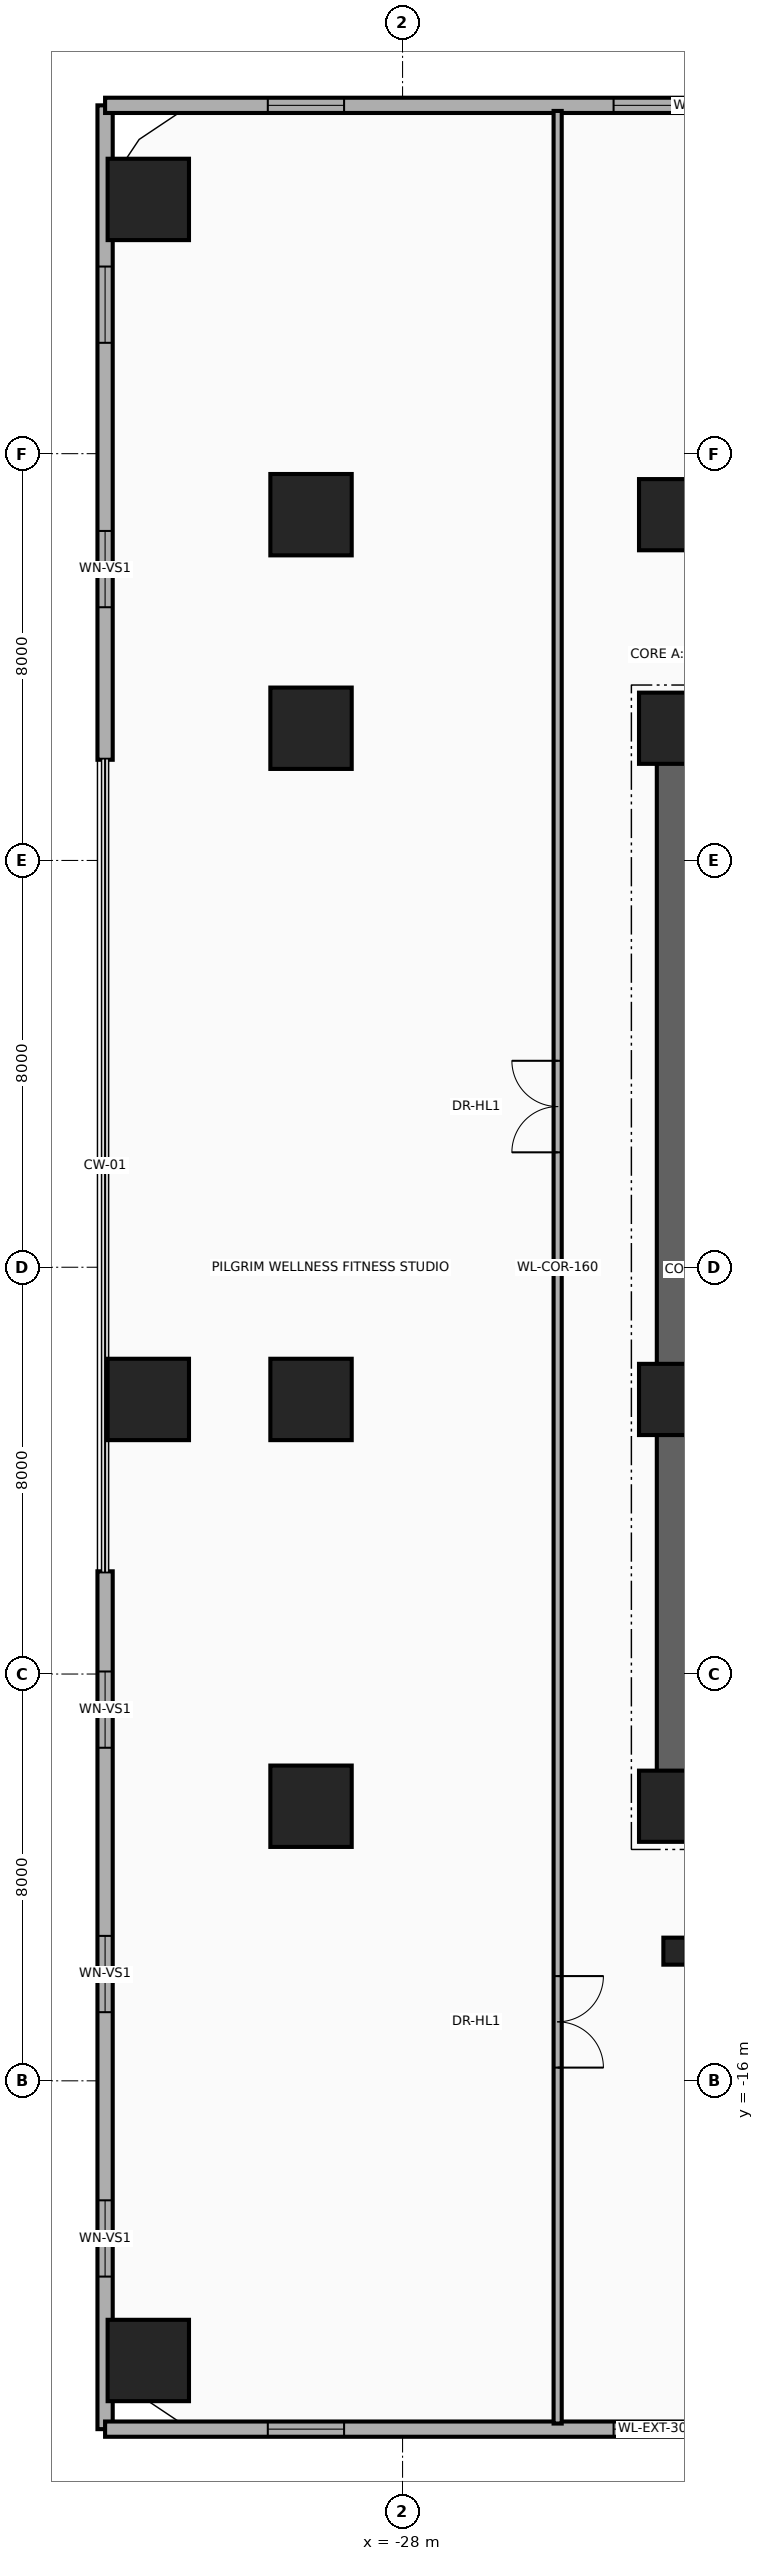
"""IFC4 building model, lengths in metres.
Left out: names, types, materials, properties, quantities, classifications, styles, units other than length and angle.
Written with IfcOpenShell. Run it as: python <this file> out.ifc"""

import sys

from ifc_helpers import new_model, si_unit, direction, frame, frame_2d, origin, origin_2d, place, context, subcontext, project, spatial, rectangle, i_section, extrude, source, transform, mapped, element, fill, save


model = new_model("IFC4")
c1 = context("Model", 3, precision=1e-05, world=origin(), true_north=direction((0.0, 1.0)))
c2 = subcontext(c1, "Body", "Model", "MODEL_VIEW")
j1 = project(units=[si_unit("LENGTHUNIT", "METRE"), si_unit("PLANEANGLEUNIT", "RADIAN")], contexts=[c1])
p1 = place(None, origin())
s1 = spatial("IfcSite", under=j1, at=p1, CompositionType="ELEMENT")
p2 = place(p1, origin())
s2 = spatial("IfcBuilding", under=s1, at=p2, CompositionType="ELEMENT")
p3 = place(p2, frame((0.0, 0.0, 20.8)))
s3 = spatial("IfcBuildingStorey", under=s2, at=p3, CompositionType="ELEMENT", Elevation=20.8)
p4 = place(p3, frame((-22.65, -11.15, 0.0), z_axis=(0.0, 0.0, 1.0), x_axis=(0.0, 1.0, 0.0)))
e1 = element("IfcWall", 1, at=p4, inside=s3, PredefinedType="SHEAR", context=c2, shape_type="SweptSolid", body=[
    extrude(rectangle(XDim=22.3, YDim=0.7, at=frame_2d((11.15, 0.0))), origin(), (0.0, 0.0, 1.0), 4.96),
])
for number, where, z_axis, x_axis in (
    (2, (-22.65, 10.8, 0.0), (0.0, 0.0, 1.0), (1.0, 0.0, 0.0)),
    (3, (-22.65, -10.8, 0.0), (0.0, 0.0, 1.0), (1.0, 0.0, 0.0)),
):
    element("IfcWall", number, at=place(p3, frame(where, z_axis=z_axis, x_axis=x_axis)), inside=s3, PredefinedType="SHEAR", context=c2, shape_type="SweptSolid", body=[
        extrude(rectangle(XDim=10.25, YDim=0.7, at=frame_2d((5.125, 0.0))), origin(), (0.0, 0.0, 1.0), 4.96),
    ])
m1 = source(origin(), c2, "Body", "SweptSolid", [
    extrude(rectangle(XDim=1.6, YDim=1.6, at=origin_2d()), origin(), (0.0, 0.0, 1.0), 5.2),
])
p5 = place(p3, frame((-29.8, -10.6, 0.0), z_axis=(0.0, 0.0, 1.0), x_axis=(1.0, 0.0, 0.0)))
e4 = element("IfcColumn", 4, at=p5, inside=s3, PredefinedType="COLUMN", context=c2, shape_type="MappedRepresentation", body=[
    mapped(m1, transform((0.0, 0.0, 0.0), x_axis=(1.0, 0.0, 0.0), y_axis=(0.0, 1.0, 0.0), z_axis=(0.0, 0.0, 1.0), scale=1.0)),
])
m2 = source(origin(), c2, "Body", "SweptSolid", [
    extrude(rectangle(XDim=1.4, YDim=1.4, at=origin_2d()), origin(), (0.0, 0.0, 1.0), 5.2),
])
p6 = place(p3, frame((-22.65, -10.6, 0.0), z_axis=(0.0, 0.0, 1.0), x_axis=(1.0, 0.0, 0.0)))
e5 = element("IfcColumn", 5, at=p6, inside=s3, PredefinedType="COLUMN", context=c2, shape_type="MappedRepresentation", body=[
    mapped(m2, transform((0.0, 0.0, 0.0), x_axis=(1.0, 0.0, 0.0), y_axis=(0.0, 1.0, 0.0), z_axis=(0.0, 0.0, 1.0), scale=1.0)),
])
p7 = place(p3, frame((-29.8, -2.6, 0.0), z_axis=(0.0, 0.0, 1.0), x_axis=(1.0, 0.0, 0.0)))
e6 = element("IfcColumn", 6, at=p7, inside=s3, PredefinedType="COLUMN", context=c2, shape_type="MappedRepresentation", body=[
    mapped(m1, transform((0.0, 0.0, 0.0), x_axis=(1.0, 0.0, 0.0), y_axis=(0.0, 1.0, 0.0), z_axis=(0.0, 0.0, 1.0), scale=1.0)),
])
p8 = place(p3, frame((-22.65, -2.6, 0.0), z_axis=(0.0, 0.0, 1.0), x_axis=(1.0, 0.0, 0.0)))
e7 = element("IfcColumn", 7, at=p8, inside=s3, PredefinedType="COLUMN", context=c2, shape_type="MappedRepresentation", body=[
    mapped(m2, transform((0.0, 0.0, 0.0), x_axis=(1.0, 0.0, 0.0), y_axis=(0.0, 1.0, 0.0), z_axis=(0.0, 0.0, 1.0), scale=1.0)),
])
p9 = place(p3, frame((-29.8, 10.6, 0.0), z_axis=(0.0, 0.0, 1.0), x_axis=(1.0, 0.0, 0.0)))
e8 = element("IfcColumn", 8, at=p9, inside=s3, PredefinedType="COLUMN", context=c2, shape_type="MappedRepresentation", body=[
    mapped(m1, transform((0.0, 0.0, 0.0), x_axis=(1.0, 0.0, 0.0), y_axis=(0.0, 1.0, 0.0), z_axis=(0.0, 0.0, 1.0), scale=1.0)),
])
p10 = place(p3, frame((-22.65, 10.6, 0.0), z_axis=(0.0, 0.0, 1.0), x_axis=(1.0, 0.0, 0.0)))
e9 = element("IfcColumn", 9, at=p10, inside=s3, PredefinedType="COLUMN", context=c2, shape_type="MappedRepresentation", body=[
    mapped(m2, transform((0.0, 0.0, 0.0), x_axis=(1.0, 0.0, 0.0), y_axis=(0.0, 1.0, 0.0), z_axis=(0.0, 0.0, 1.0), scale=1.0)),
])
p11 = place(p3, frame((-29.8, 14.8, 0.0), z_axis=(0.0, 0.0, 1.0), x_axis=(1.0, 0.0, 0.0)))
e10 = element("IfcColumn", 10, at=p11, inside=s3, PredefinedType="COLUMN", context=c2, shape_type="MappedRepresentation", body=[
    mapped(m1, transform((0.0, 0.0, 0.0), x_axis=(1.0, 0.0, 0.0), y_axis=(0.0, 1.0, 0.0), z_axis=(0.0, 0.0, 1.0), scale=1.0)),
])
p12 = place(p3, frame((-22.65, 14.8, 0.0), z_axis=(0.0, 0.0, 1.0), x_axis=(1.0, 0.0, 0.0)))
e11 = element("IfcColumn", 11, at=p12, inside=s3, PredefinedType="COLUMN", context=c2, shape_type="MappedRepresentation", body=[
    mapped(m2, transform((0.0, 0.0, 0.0), x_axis=(1.0, 0.0, 0.0), y_axis=(0.0, 1.0, 0.0), z_axis=(0.0, 0.0, 1.0), scale=1.0)),
])
m3 = source(origin(), c2, "Body", "SweptSolid", [
    extrude(i_section(OverallWidth=0.442, OverallDepth=0.531, WebThickness=0.066, FlangeThickness=0.106, at=origin_2d()), origin(), (0.0, 0.0, 1.0), 5.2),
])
p13 = place(p3, frame((-22.65, -13.45, 0.0), z_axis=(0.0, 0.0, 1.0), x_axis=(1.0, 0.0, 0.0)))
e12 = element("IfcColumn", 12, at=p13, inside=s3, PredefinedType="COLUMN", context=c2, shape_type="MappedRepresentation", body=[
    mapped(m3, transform((0.0, 0.0, 0.0), x_axis=(1.0, 0.0, 0.0), y_axis=(0.0, 1.0, 0.0), z_axis=(0.0, 0.0, 1.0), scale=1.0)),
])
for number, where, z_axis, x_axis in (
    (13, (-33.0, -21.5, 0.0), (0.0, 0.0, 1.0), (1.0, 0.0, 0.0)),
    (14, (-33.0, -2.6, 0.0), (0.0, 0.0, 1.0), (1.0, 0.0, 0.0)),
    (15, (-33.0, 21.0, 0.0), (0.0, 0.0, 1.0), (1.0, 0.0, 0.0)),
):
    element("IfcColumn", number, at=place(p3, frame(where, z_axis=z_axis, x_axis=x_axis)), inside=s3, PredefinedType="COLUMN", context=c2, shape_type="MappedRepresentation", body=[
        mapped(m1, transform((0.0, 0.0, 0.0), x_axis=(1.0, 0.0, 0.0), y_axis=(0.0, 1.0, 0.0), z_axis=(0.0, 0.0, 1.0), scale=1.0)),
    ])
p14 = place(p3, frame((-33.85, -22.85, 0.0), z_axis=(0.0, 0.0, 1.0), x_axis=(0.0, 1.0, 0.0)))
e16 = element("IfcWall", 16, at=p14, inside=s3, PredefinedType="SOLIDWALL", context=c2, shape_type="SweptSolid", body=[
    extrude(rectangle(XDim=16.87, YDim=0.3, at=frame_2d((8.435, 0.0))), origin(), (0.0, 0.0, 1.0), 4.594),
])
p15 = place(p14, frame((3.0, 0.0, 0.9)))
e17 = element("IfcOpeningElement", 17, at=p15, cuts=e16, PredefinedType="OPENING", context=c2, shape_type="SweptSolid", body=[
    extrude(rectangle(XDim=1.5, YDim=1.75, at=frame_2d((0.75, 0.875))), frame((0.0, 0.165, 0.0), z_axis=(0.0, -1.0, 0.0), x_axis=(1.0, 0.0, 0.0)), (0.0, 0.0, 1.0), 0.33),
])
p16 = place(p14, frame((8.2, 0.0, 0.9)))
e18 = element("IfcOpeningElement", 18, at=p16, cuts=e16, PredefinedType="OPENING", context=c2, shape_type="SweptSolid", body=[
    extrude(rectangle(XDim=1.5, YDim=1.75, at=frame_2d((0.75, 0.875))), frame((0.0, 0.165, 0.0), z_axis=(0.0, -1.0, 0.0), x_axis=(1.0, 0.0, 0.0)), (0.0, 0.0, 1.0), 0.33),
])
p17 = place(p14, frame((13.4, 0.0, 0.9)))
e19 = element("IfcOpeningElement", 19, at=p17, cuts=e16, PredefinedType="OPENING", context=c2, shape_type="SweptSolid", body=[
    extrude(rectangle(XDim=1.5, YDim=1.75, at=frame_2d((0.75, 0.875))), frame((0.0, 0.165, 0.0), z_axis=(0.0, -1.0, 0.0), x_axis=(1.0, 0.0, 0.0)), (0.0, 0.0, 1.0), 0.33),
])
p18 = place(p3, frame((-33.85, 9.98, 0.0), z_axis=(0.0, 0.0, 1.0), x_axis=(0.0, 1.0, 0.0)))
e20 = element("IfcWall", 20, at=p18, inside=s3, PredefinedType="SOLIDWALL", context=c2, shape_type="SweptSolid", body=[
    extrude(rectangle(XDim=12.87, YDim=0.3, at=frame_2d((6.435, 0.0))), origin(), (0.0, 0.0, 1.0), 4.96),
])
p19 = place(p18, frame((3.0, 0.0, 0.9)))
e21 = element("IfcOpeningElement", 21, at=p19, cuts=e20, PredefinedType="OPENING", context=c2, shape_type="SweptSolid", body=[
    extrude(rectangle(XDim=1.5, YDim=1.75, at=frame_2d((0.75, 0.875))), frame((0.0, 0.165, 0.0), z_axis=(0.0, -1.0, 0.0), x_axis=(1.0, 0.0, 0.0)), (0.0, 0.0, 1.0), 0.33),
])
p20 = place(p18, frame((8.2, 0.0, 0.9)))
e22 = element("IfcOpeningElement", 22, at=p20, cuts=e20, PredefinedType="OPENING", context=c2, shape_type="SweptSolid", body=[
    extrude(rectangle(XDim=1.5, YDim=1.75, at=frame_2d((0.75, 0.875))), frame((0.0, 0.165, 0.0), z_axis=(0.0, -1.0, 0.0), x_axis=(1.0, 0.0, 0.0)), (0.0, 0.0, 1.0), 0.33),
])
p21 = place(p3, frame((-33.85, -22.85, 0.0), z_axis=(0.0, 0.0, 1.0), x_axis=(1.0, 0.0, 0.0)))
e23 = element("IfcWall", 23, at=p21, inside=s3, PredefinedType="SOLIDWALL", context=c2, shape_type="SweptSolid", body=[
    extrude(rectangle(XDim=21.69, YDim=0.3, at=frame_2d((10.845, 0.0))), origin(), (0.0, 0.0, 1.0), 4.96),
])
p22 = place(p21, frame((3.2, 0.0, 0.9)))
e24 = element("IfcOpeningElement", 24, at=p22, cuts=e23, PredefinedType="OPENING", context=c2, shape_type="SweptSolid", body=[
    extrude(rectangle(XDim=1.5, YDim=1.75, at=frame_2d((0.75, 0.875))), frame((0.0, 0.165, 0.0), z_axis=(0.0, -1.0, 0.0), x_axis=(1.0, 0.0, 0.0)), (0.0, 0.0, 1.0), 0.33),
])
p23 = place(p21, frame((10.0, 0.0, 0.9)))
e25 = element("IfcOpeningElement", 25, at=p23, cuts=e23, PredefinedType="OPENING", context=c2, shape_type="SweptSolid", body=[
    extrude(rectangle(XDim=1.5, YDim=1.75, at=frame_2d((0.75, 0.875))), frame((0.0, 0.165, 0.0), z_axis=(0.0, -1.0, 0.0), x_axis=(1.0, 0.0, 0.0)), (0.0, 0.0, 1.0), 0.33),
])
p24 = place(p21, frame((17.8, 0.0, 0.9)))
e26 = element("IfcOpeningElement", 26, at=p24, cuts=e23, PredefinedType="OPENING", context=c2, shape_type="SweptSolid", body=[
    extrude(rectangle(XDim=1.5, YDim=1.75, at=frame_2d((0.75, 0.875))), frame((0.0, 0.165, 0.0), z_axis=(0.0, -1.0, 0.0), x_axis=(1.0, 0.0, 0.0)), (0.0, 0.0, 1.0), 0.33),
])
p25 = place(p3, frame((-33.85, 22.85, 0.0), z_axis=(0.0, 0.0, 1.0), x_axis=(1.0, 0.0, 0.0)))
e27 = element("IfcWall", 27, at=p25, inside=s3, PredefinedType="SOLIDWALL", context=c2, shape_type="SweptSolid", body=[
    extrude(rectangle(XDim=23.87, YDim=0.3, at=frame_2d((11.935, 0.0))), origin(), (0.0, 0.0, 1.0), 4.96),
])
p26 = place(p25, frame((3.2, 0.0, 0.9)))
e28 = element("IfcOpeningElement", 28, at=p26, cuts=e27, PredefinedType="OPENING", context=c2, shape_type="SweptSolid", body=[
    extrude(rectangle(XDim=1.5, YDim=1.75, at=frame_2d((0.75, 0.875))), frame((0.0, 0.165, 0.0), z_axis=(0.0, -1.0, 0.0), x_axis=(1.0, 0.0, 0.0)), (0.0, 0.0, 1.0), 0.33),
])
p27 = place(p25, frame((10.0, 0.0, 0.9)))
e29 = element("IfcOpeningElement", 29, at=p27, cuts=e27, PredefinedType="OPENING", context=c2, shape_type="SweptSolid", body=[
    extrude(rectangle(XDim=1.5, YDim=1.75, at=frame_2d((0.75, 0.875))), frame((0.0, 0.165, 0.0), z_axis=(0.0, -1.0, 0.0), x_axis=(1.0, 0.0, 0.0)), (0.0, 0.0, 1.0), 0.33),
])
p28 = place(p25, frame((17.8, 0.0, 0.9)))
e30 = element("IfcOpeningElement", 30, at=p28, cuts=e27, PredefinedType="OPENING", context=c2, shape_type="SweptSolid", body=[
    extrude(rectangle(XDim=1.5, YDim=1.75, at=frame_2d((0.75, 0.875))), frame((0.0, 0.165, 0.0), z_axis=(0.0, -1.0, 0.0), x_axis=(1.0, 0.0, 0.0)), (0.0, 0.0, 1.0), 0.33),
])
p29 = place(p3, frame((-24.95, -22.74, 0.0), z_axis=(0.0, 0.0, 1.0), x_axis=(0.0, 1.0, 0.0)))
e31 = element("IfcWall", 31, at=p29, inside=s3, PredefinedType="PARTITIONING", context=c2, shape_type="SweptSolid", body=[
    extrude(rectangle(XDim=45.48, YDim=0.16, at=frame_2d((22.74, 0.0))), origin(), (0.0, 0.0, 1.0), 3.745),
])
p30 = place(p29, frame((7.0, 0.0, 0.0)))
e32 = element("IfcOpeningElement", 32, at=p30, cuts=e31, PredefinedType="OPENING", context=c2, shape_type="SweptSolid", body=[
    extrude(rectangle(XDim=1.8, YDim=2.15, at=frame_2d((0.9, 1.075))), frame((0.0, 0.095, 0.0), z_axis=(0.0, -1.0, 0.0), x_axis=(1.0, 0.0, 0.0)), (0.0, 0.0, 1.0), 0.19),
])
p31 = place(p29, frame((25.0, 0.0, 0.0)))
e33 = element("IfcOpeningElement", 33, at=p31, cuts=e31, PredefinedType="OPENING", context=c2, shape_type="SweptSolid", body=[
    extrude(rectangle(XDim=1.8, YDim=2.15, at=frame_2d((0.9, 1.075))), frame((0.0, 0.095, 0.0), z_axis=(0.0, -1.0, 0.0), x_axis=(1.0, 0.0, 0.0)), (0.0, 0.0, 1.0), 0.19),
])
p32 = place(p15, origin())
e34 = element("IfcWindow", 34, at=p32, inside=s3, PartitioningType="SINGLE_PANEL", PredefinedType="WINDOW", context=c2, shape_type="SweptSolid", body=[
    extrude(rectangle(XDim=1.5, YDim=1.75, at=frame_2d((0.75, 0.875))), frame((0.0, 0.03, 0.0), z_axis=(0.0, -1.0, 0.0), x_axis=(1.0, 0.0, 0.0)), (0.0, 0.0, 1.0), 0.06),
])
fill(e17, e34)
p33 = place(p16, origin())
e35 = element("IfcWindow", 35, at=p33, inside=s3, PartitioningType="SINGLE_PANEL", PredefinedType="WINDOW", context=c2, shape_type="SweptSolid", body=[
    extrude(rectangle(XDim=1.5, YDim=1.75, at=frame_2d((0.75, 0.875))), frame((0.0, 0.03, 0.0), z_axis=(0.0, -1.0, 0.0), x_axis=(1.0, 0.0, 0.0)), (0.0, 0.0, 1.0), 0.06),
])
fill(e18, e35)
p34 = place(p17, origin())
e36 = element("IfcWindow", 36, at=p34, inside=s3, PartitioningType="SINGLE_PANEL", PredefinedType="WINDOW", context=c2, shape_type="SweptSolid", body=[
    extrude(rectangle(XDim=1.5, YDim=1.75, at=frame_2d((0.75, 0.875))), frame((0.0, 0.03, 0.0), z_axis=(0.0, -1.0, 0.0), x_axis=(1.0, 0.0, 0.0)), (0.0, 0.0, 1.0), 0.06),
])
fill(e19, e36)
p35 = place(p19, origin())
e37 = element("IfcWindow", 37, at=p35, inside=s3, PartitioningType="SINGLE_PANEL", PredefinedType="WINDOW", context=c2, shape_type="SweptSolid", body=[
    extrude(rectangle(XDim=1.5, YDim=1.75, at=frame_2d((0.75, 0.875))), frame((0.0, 0.03, 0.0), z_axis=(0.0, -1.0, 0.0), x_axis=(1.0, 0.0, 0.0)), (0.0, 0.0, 1.0), 0.06),
])
fill(e21, e37)
p36 = place(p20, origin())
e38 = element("IfcWindow", 38, at=p36, inside=s3, PartitioningType="SINGLE_PANEL", PredefinedType="WINDOW", context=c2, shape_type="SweptSolid", body=[
    extrude(rectangle(XDim=1.5, YDim=1.75, at=frame_2d((0.75, 0.875))), frame((0.0, 0.03, 0.0), z_axis=(0.0, -1.0, 0.0), x_axis=(1.0, 0.0, 0.0)), (0.0, 0.0, 1.0), 0.06),
])
fill(e22, e38)
p37 = place(p22, origin())
e39 = element("IfcWindow", 39, at=p37, inside=s3, PartitioningType="SINGLE_PANEL", PredefinedType="WINDOW", context=c2, shape_type="SweptSolid", body=[
    extrude(rectangle(XDim=1.5, YDim=1.75, at=frame_2d((0.75, 0.875))), frame((0.0, 0.03, 0.0), z_axis=(0.0, -1.0, 0.0), x_axis=(1.0, 0.0, 0.0)), (0.0, 0.0, 1.0), 0.06),
])
fill(e24, e39)
p38 = place(p23, origin())
e40 = element("IfcWindow", 40, at=p38, inside=s3, PartitioningType="SINGLE_PANEL", PredefinedType="WINDOW", context=c2, shape_type="SweptSolid", body=[
    extrude(rectangle(XDim=1.5, YDim=1.75, at=frame_2d((0.75, 0.875))), frame((0.0, 0.03, 0.0), z_axis=(0.0, -1.0, 0.0), x_axis=(1.0, 0.0, 0.0)), (0.0, 0.0, 1.0), 0.06),
])
fill(e25, e40)
p39 = place(p26, origin())
e41 = element("IfcWindow", 41, at=p39, inside=s3, PartitioningType="SINGLE_PANEL", PredefinedType="WINDOW", context=c2, shape_type="SweptSolid", body=[
    extrude(rectangle(XDim=1.5, YDim=1.75, at=frame_2d((0.75, 0.875))), frame((0.0, 0.03, 0.0), z_axis=(0.0, -1.0, 0.0), x_axis=(1.0, 0.0, 0.0)), (0.0, 0.0, 1.0), 0.06),
])
fill(e28, e41)
p40 = place(p27, origin())
e42 = element("IfcWindow", 42, at=p40, inside=s3, PartitioningType="SINGLE_PANEL", PredefinedType="WINDOW", context=c2, shape_type="SweptSolid", body=[
    extrude(rectangle(XDim=1.5, YDim=1.75, at=frame_2d((0.75, 0.875))), frame((0.0, 0.03, 0.0), z_axis=(0.0, -1.0, 0.0), x_axis=(1.0, 0.0, 0.0)), (0.0, 0.0, 1.0), 0.06),
])
fill(e29, e42)
p41 = place(p30, frame((1.8, 0.0, 0.0), z_axis=(0.0, 0.0, 1.0), x_axis=(-1.0, 0.0, 0.0)))
e43 = element("IfcDoor", 43, at=p41, inside=s3, OperationType="DOUBLE_DOOR_SINGLE_SWING", PredefinedType="DOOR", context=c2, shape_type="SweptSolid", body=[
    extrude(rectangle(XDim=1.8, YDim=2.15, at=frame_2d((0.9, 1.075))), frame((0.0, 0.025, 0.0), z_axis=(0.0, -1.0, 0.0), x_axis=(1.0, 0.0, 0.0)), (0.0, 0.0, 1.0), 0.05),
])
fill(e32, e43)
p42 = place(p31, origin())
e44 = element("IfcDoor", 44, at=p42, inside=s3, OperationType="DOUBLE_DOOR_SINGLE_SWING", PredefinedType="DOOR", context=c2, shape_type="SweptSolid", body=[
    extrude(rectangle(XDim=1.8, YDim=2.15, at=frame_2d((0.9, 1.075))), frame((0.0, 0.025, 0.0), z_axis=(0.0, -1.0, 0.0), x_axis=(1.0, 0.0, 0.0)), (0.0, 0.0, 1.0), 0.05),
])
fill(e33, e44)
save(model, sys.argv[1])
